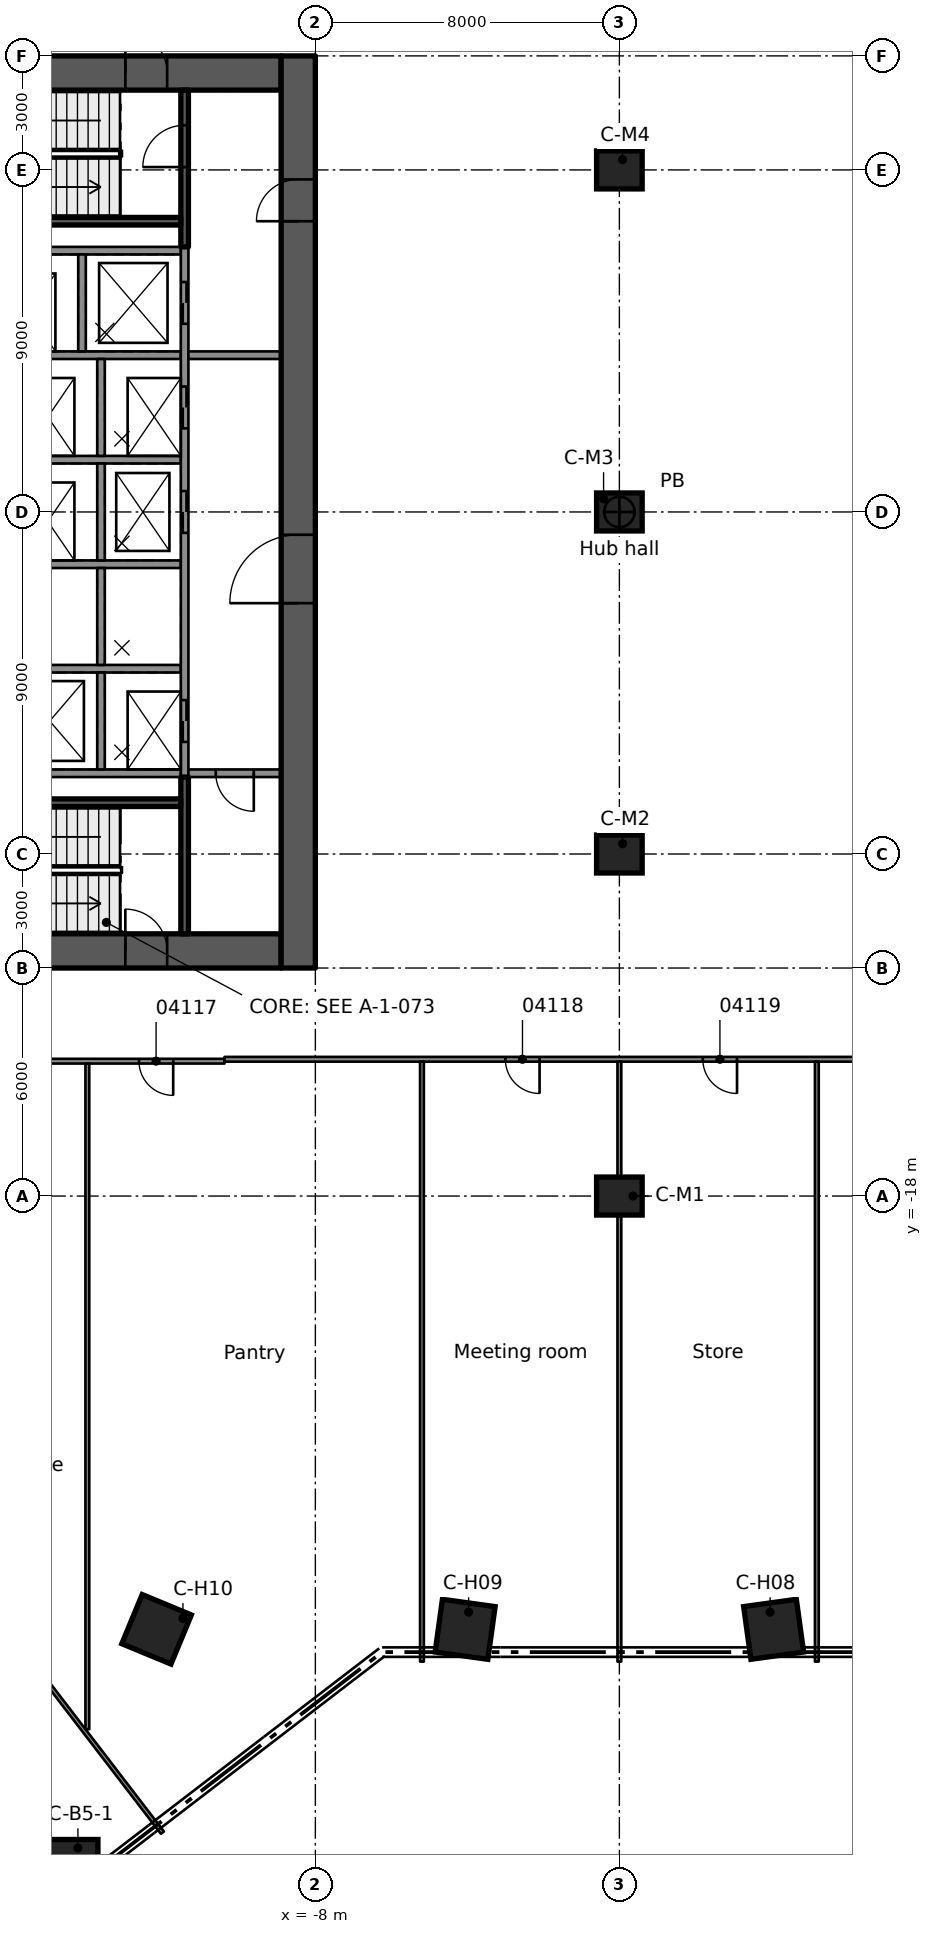
"""IFC4 building model, lengths in metres.
Left out: names, types, materials, properties, quantities, classifications, styles, units other than length and angle.
Written with IfcOpenShell. Run it as: python <this file> out.ifc"""

import sys

from ifc_helpers import new_model, si_unit, direction, frame, frame_2d, origin, origin_2d, place, context, subcontext, project, spatial, rectangle, extrude, element, fill, save


model = new_model("IFC4")
c1 = context("Model", 3, precision=1e-05, world=origin(), true_north=direction((0.0, 1.0)))
c2 = subcontext(c1, "Body", "Model", "MODEL_VIEW")
j1 = project(units=[si_unit("LENGTHUNIT", "METRE"), si_unit("PLANEANGLEUNIT", "RADIAN")], contexts=[c1])
p1 = place(None, origin())
s1 = spatial("IfcSite", under=j1, at=p1, CompositionType="ELEMENT")
p2 = place(p1, origin())
s2 = spatial("IfcBuilding", under=s1, at=p2, CompositionType="ELEMENT")
p3 = place(p2, frame((0.0, 0.0, 20.5)))
s3 = spatial("IfcBuildingStorey", under=s2, at=p3, CompositionType="ELEMENT", Elevation=20.5)
p4 = place(p3, frame((-18.1, 11.55, 0.0), z_axis=(0.0, 0.0, 1.0), x_axis=(1.0, 0.0, 0.0)))
e1 = element("IfcWall", 1, at=p4, inside=s3, PredefinedType="SHEAR", context=c2, shape_type="SweptSolid", body=[
    extrude(rectangle(XDim=9.2, YDim=0.9, at=frame_2d((4.6, 0.0))), origin(), (0.0, 0.0, 1.0), 4.6),
])
p5 = place(p4, frame((5.1, 0.0, 0.0)))
e2 = element("IfcOpeningElement", 2, at=p5, cuts=e1, PredefinedType="OPENING", context=c2, shape_type="SweptSolid", body=[
    extrude(rectangle(XDim=1.1, YDim=2.1, at=frame_2d((0.55, 1.05))), frame((0.0, 0.46, 0.0), z_axis=(0.0, -1.0, 0.0), x_axis=(1.0, 0.0, 0.0)), (0.0, 0.0, 1.0), 0.92),
])
p6 = place(p3, frame((-18.1, -11.55, 0.0), z_axis=(0.0, 0.0, 1.0), x_axis=(1.0, 0.0, 0.0)))
e3 = element("IfcWall", 3, at=p6, inside=s3, PredefinedType="SHEAR", context=c2, shape_type="SweptSolid", body=[
    extrude(rectangle(XDim=9.2, YDim=0.9, at=frame_2d((4.6, 0.0))), origin(), (0.0, 0.0, 1.0), 4.6),
])
p7 = place(p6, frame((5.1, 0.0, 0.0)))
e4 = element("IfcOpeningElement", 4, at=p7, cuts=e3, PredefinedType="OPENING", context=c2, shape_type="SweptSolid", body=[
    extrude(rectangle(XDim=1.1, YDim=2.1, at=frame_2d((0.55, 1.05))), frame((0.0, 0.46, 0.0), z_axis=(0.0, -1.0, 0.0), x_axis=(1.0, 0.0, 0.0)), (0.0, 0.0, 1.0), 0.92),
])
p8 = place(p3, frame((-8.45, -12.0, 0.0), z_axis=(0.0, 0.0, 1.0), x_axis=(0.0, 1.0, 0.0)))
e5 = element("IfcWall", 5, at=p8, inside=s3, PredefinedType="SHEAR", context=c2, shape_type="SweptSolid", body=[
    extrude(rectangle(XDim=24.0, YDim=0.9, at=frame_2d((12.0, 0.0))), origin(), (0.0, 0.0, 1.0), 4.6),
])
p9 = place(p8, frame((9.6, 0.0, 0.0)))
e6 = element("IfcOpeningElement", 6, at=p9, cuts=e5, PredefinedType="OPENING", context=c2, shape_type="SweptSolid", body=[
    extrude(rectangle(XDim=1.8, YDim=2.1, at=frame_2d((0.9, 1.05))), frame((0.0, 0.46, 0.0), z_axis=(0.0, -1.0, 0.0), x_axis=(1.0, 0.0, 0.0)), (0.0, 0.0, 1.0), 0.92),
])
p10 = place(p8, frame((19.65, 0.0, 0.0)))
e7 = element("IfcOpeningElement", 7, at=p10, cuts=e5, PredefinedType="OPENING", context=c2, shape_type="SweptSolid", body=[
    extrude(rectangle(XDim=1.1, YDim=2.1, at=frame_2d((0.55, 1.05))), frame((0.0, 0.46, 0.0), z_axis=(0.0, -1.0, 0.0), x_axis=(1.0, 0.0, 0.0)), (0.0, 0.0, 1.0), 0.92),
])
p11 = place(p3, frame((-14.371, -35.48, 0.0), z_axis=(0.0, 0.0, 1.0), x_axis=(1.0, 0.0, 0.0)))
e8 = element("IfcColumn", 8, at=p11, inside=s3, PredefinedType="COLUMN", context=c2, shape_type="SweptSolid", body=[
    extrude(rectangle(XDim=1.3, YDim=1.1, at=origin_2d()), origin(), (0.0, 0.0, 1.0), 4.6),
])
for number, where, z_axis, x_axis in (
    (9, (4.059, -29.4, 0.0), (0.0, 0.0, 1.0), (0.137, -0.991, 0.0)),
    (10, (-4.059, -29.4, 0.0), (0.0, 0.0, 1.0), (-0.137, -0.991, 0.0)),
    (11, (-12.178, -29.4, 0.0), (0.0, 0.0, 1.0), (-0.383, -0.924, 0.0)),
):
    element("IfcColumn", number, at=place(p3, frame(where, z_axis=z_axis, x_axis=x_axis)), inside=s3, PredefinedType="COLUMN", context=c2, shape_type="SweptSolid", body=[
        extrude(rectangle(XDim=1.4, YDim=1.4, at=origin_2d()), origin(), (0.0, 0.0, 1.0), 4.6),
    ])
for number, where, z_axis, x_axis in (
    (12, (0.0, -18.0, 0.0), (0.0, 0.0, 1.0), (1.0, 0.0, 0.0)),
    (13, (0.0, -9.0, 0.0), (0.0, 0.0, 1.0), (1.0, 0.0, 0.0)),
    (14, (0.0, 0.0, 0.0), (0.0, 0.0, 1.0), (1.0, 0.0, 0.0)),
    (15, (0.0, 9.0, 0.0), (0.0, 0.0, 1.0), (1.0, 0.0, 0.0)),
):
    element("IfcColumn", number, at=place(p3, frame(where, z_axis=z_axis, x_axis=x_axis)), inside=s3, PredefinedType="COLUMN", context=c2, shape_type="SweptSolid", body=[
        extrude(rectangle(XDim=1.2, YDim=1.0, at=origin_2d()), origin(), (0.0, 0.0, 1.0), 4.6),
    ])
for number, where, z_axis, x_axis in (
    (16, (-11.54, 6.875, 0.0), (0.0, 0.0, 1.0), (-1.0, 0.0, 0.0)),
    (17, (-11.54, -6.875, 0.0), (0.0, 0.0, 1.0), (-1.0, 0.0, 0.0)),
):
    element("IfcWall", number, at=place(p3, frame(where, z_axis=z_axis, x_axis=x_axis)), inside=s3, PredefinedType="SOLIDWALL", context=c2, shape_type="SweptSolid", body=[
        extrude(rectangle(XDim=6.56, YDim=0.2, at=frame_2d((3.28, 0.0))), origin(), (0.0, 0.0, 1.0), 4.18),
    ])
p12 = place(p3, frame((-11.54, -4.125, 0.0), z_axis=(0.0, 0.0, 1.0), x_axis=(-1.0, 0.0, 0.0)))
e18 = element("IfcWall", 18, at=p12, inside=s3, PredefinedType="SOLIDWALL", context=c2, shape_type="SweptSolid", body=[
    extrude(rectangle(XDim=4.7, YDim=0.2, at=frame_2d((2.35, 0.0))), origin(), (0.0, 0.0, 1.0), 4.18),
])
for number, where, z_axis, x_axis in (
    (19, (-11.54, -1.375, 0.0), (0.0, 0.0, 1.0), (-1.0, 0.0, 0.0)),
    (20, (-11.54, 1.375, 0.0), (0.0, 0.0, 1.0), (-1.0, 0.0, 0.0)),
):
    element("IfcWall", number, at=place(p3, frame(where, z_axis=z_axis, x_axis=x_axis)), inside=s3, PredefinedType="SOLIDWALL", context=c2, shape_type="SweptSolid", body=[
        extrude(rectangle(XDim=4.2, YDim=0.2, at=frame_2d((2.1, 0.0))), origin(), (0.0, 0.0, 1.0), 4.18),
    ])
p13 = place(p3, frame((-11.54, 4.125, 0.0), z_axis=(0.0, 0.0, 1.0), x_axis=(-1.0, 0.0, 0.0)))
e21 = element("IfcWall", 21, at=p13, inside=s3, PredefinedType="SOLIDWALL", context=c2, shape_type="SweptSolid", body=[
    extrude(rectangle(XDim=4.7, YDim=0.2, at=frame_2d((2.35, 0.0))), origin(), (0.0, 0.0, 1.0), 4.18),
])
p14 = place(p3, frame((-11.44, -6.975, 0.0), z_axis=(0.0, 0.0, 1.0), x_axis=(0.0, 1.0, 0.0)))
e22 = element("IfcWall", 22, at=p14, inside=s3, PredefinedType="SOLIDWALL", context=c2, shape_type="SweptSolid", body=[
    extrude(rectangle(XDim=13.95, YDim=0.2, at=frame_2d((6.975, 0.0))), origin(), (0.0, 0.0, 1.0), 4.18),
])
p15 = place(p14, frame((0.925, 0.0, 0.0)))
e23 = element("IfcOpeningElement", 23, at=p15, cuts=e22, PredefinedType="OPENING", context=c2, shape_type="SweptSolid", body=[
    extrude(rectangle(XDim=1.1, YDim=2.1, at=frame_2d((0.55, 1.05))), frame((0.0, 0.11, 0.0), z_axis=(0.0, -1.0, 0.0), x_axis=(1.0, 0.0, 0.0)), (0.0, 0.0, 1.0), 0.22),
])
p16 = place(p14, frame((6.425, 0.0, 0.0)))
e24 = element("IfcOpeningElement", 24, at=p16, cuts=e22, PredefinedType="OPENING", context=c2, shape_type="SweptSolid", body=[
    extrude(rectangle(XDim=1.1, YDim=2.1, at=frame_2d((0.55, 1.05))), frame((0.0, 0.11, 0.0), z_axis=(0.0, -1.0, 0.0), x_axis=(1.0, 0.0, 0.0)), (0.0, 0.0, 1.0), 0.22),
])
p17 = place(p14, frame((9.175, 0.0, 0.0)))
e25 = element("IfcOpeningElement", 25, at=p17, cuts=e22, PredefinedType="OPENING", context=c2, shape_type="SweptSolid", body=[
    extrude(rectangle(XDim=1.1, YDim=2.1, at=frame_2d((0.55, 1.05))), frame((0.0, 0.11, 0.0), z_axis=(0.0, -1.0, 0.0), x_axis=(1.0, 0.0, 0.0)), (0.0, 0.0, 1.0), 0.22),
])
p18 = place(p14, frame((11.925, 0.0, 0.0)))
e26 = element("IfcOpeningElement", 26, at=p18, cuts=e22, PredefinedType="OPENING", context=c2, shape_type="SweptSolid", body=[
    extrude(rectangle(XDim=1.1, YDim=2.1, at=frame_2d((0.55, 1.05))), frame((0.0, 0.11, 0.0), z_axis=(0.0, -1.0, 0.0), x_axis=(1.0, 0.0, 0.0)), (0.0, 0.0, 1.0), 0.22),
])
for number, where, z_axis, x_axis in (
    (27, (-13.64, -6.775, 0.0), (0.0, 0.0, 1.0), (0.0, 1.0, 0.0)),
    (28, (-13.64, -4.025, 0.0), (0.0, 0.0, 1.0), (0.0, 1.0, 0.0)),
    (29, (-13.64, -1.275, 0.0), (0.0, 0.0, 1.0), (0.0, 1.0, 0.0)),
    (30, (-13.64, 1.475, 0.0), (0.0, 0.0, 1.0), (0.0, 1.0, 0.0)),
    (31, (-14.14, 4.225, 0.0), (0.0, 0.0, 1.0), (0.0, 1.0, 0.0)),
):
    element("IfcWall", number, at=place(p3, frame(where, z_axis=z_axis, x_axis=x_axis)), inside=s3, PredefinedType="SOLIDWALL", context=c2, shape_type="SweptSolid", body=[
        extrude(rectangle(XDim=2.55, YDim=0.2, at=frame_2d((1.275, 0.0))), origin(), (0.0, 0.0, 1.0), 4.18),
    ])
p19 = place(p3, frame((-11.44, 6.975, 0.0), z_axis=(0.0, 0.0, 1.0), x_axis=(0.0, 1.0, 0.0)))
e32 = element("IfcWall", 32, at=p19, inside=s3, PredefinedType="SOLIDWALL", context=c2, shape_type="SweptSolid", body=[
    extrude(rectangle(XDim=4.125, YDim=0.2, at=frame_2d((2.062, 0.0))), origin(), (0.0, 0.0, 1.0), 4.18),
])
p20 = place(p19, frame((2.1, 0.0, 0.0)))
e33 = element("IfcOpeningElement", 33, at=p20, cuts=e32, PredefinedType="OPENING", context=c2, shape_type="SweptSolid", body=[
    extrude(rectangle(XDim=1.1, YDim=2.1, at=frame_2d((0.55, 1.05))), frame((0.0, 0.11, 0.0), z_axis=(0.0, -1.0, 0.0), x_axis=(1.0, 0.0, 0.0)), (0.0, 0.0, 1.0), 0.22),
])
p21 = place(p3, frame((-11.54, 7.65, 0.0), z_axis=(0.0, 0.0, 1.0), x_axis=(-1.0, 0.0, 0.0)))
e34 = element("IfcWall", 34, at=p21, inside=s3, PredefinedType="SOLIDWALL", context=c2, shape_type="SweptSolid", body=[
    extrude(rectangle(XDim=6.56, YDim=0.2, at=frame_2d((3.28, 0.0))), origin(), (0.0, 0.0, 1.0), 4.18),
])
p22 = place(p3, frame((-11.44, -11.1, 0.0), z_axis=(0.0, 0.0, 1.0), x_axis=(0.0, 1.0, 0.0)))
e35 = element("IfcWall", 35, at=p22, inside=s3, PredefinedType="SOLIDWALL", context=c2, shape_type="SweptSolid", body=[
    extrude(rectangle(XDim=4.125, YDim=0.2, at=frame_2d((2.062, 0.0))), origin(), (0.0, 0.0, 1.0), 4.18),
])
p23 = place(p3, frame((-11.54, -7.65, 0.0), z_axis=(0.0, 0.0, 1.0), x_axis=(-1.0, 0.0, 0.0)))
e36 = element("IfcWall", 36, at=p23, inside=s3, PredefinedType="SOLIDWALL", context=c2, shape_type="SweptSolid", body=[
    extrude(rectangle(XDim=6.56, YDim=0.2, at=frame_2d((3.28, 0.0))), origin(), (0.0, 0.0, 1.0), 4.18),
])
p24 = place(p3, frame((-8.9, 4.125, 0.0), z_axis=(0.0, 0.0, 1.0), x_axis=(-1.0, 0.0, 0.0)))
e37 = element("IfcWall", 37, at=p24, inside=s3, PredefinedType="PARTITIONING", context=c2, shape_type="SweptSolid", body=[
    extrude(rectangle(XDim=2.44, YDim=0.2, at=frame_2d((1.22, 0.0))), origin(), (0.0, 0.0, 1.0), 4.18),
])
p25 = place(p3, frame((-8.9, -6.875, 0.0), z_axis=(0.0, 0.0, 1.0), x_axis=(-1.0, 0.0, 0.0)))
e38 = element("IfcWall", 38, at=p25, inside=s3, PredefinedType="PARTITIONING", context=c2, shape_type="SweptSolid", body=[
    extrude(rectangle(XDim=2.44, YDim=0.2, at=frame_2d((1.22, 0.0))), origin(), (0.0, 0.0, 1.0), 4.18),
])
p26 = place(p25, frame((0.72, 0.0, 0.0)))
e39 = element("IfcOpeningElement", 39, at=p26, cuts=e38, PredefinedType="OPENING", context=c2, shape_type="SweptSolid", body=[
    extrude(rectangle(XDim=1.0, YDim=2.1, at=frame_2d((0.5, 1.05))), frame((0.0, 0.11, 0.0), z_axis=(0.0, -1.0, 0.0), x_axis=(1.0, 0.0, 0.0)), (0.0, 0.0, 1.0), 0.22),
])
p27 = place(p3, frame((-20.63, -23.535, 0.0), z_axis=(0.0, 0.0, 1.0), x_axis=(0.60874219909, -0.793368095557, 0.0)))
e40 = element("IfcWall", 40, at=p27, inside=s3, PredefinedType="PARTITIONING", context=c2, shape_type="SweptSolid", body=[
    extrude(rectangle(XDim=14.137, YDim=0.1, at=frame_2d((7.069, 0.0))), origin(), (0.0, 0.0, 1.0), 4.16),
])
p28 = place(p3, frame((-10.391, -14.451, 0.0), z_axis=(0.0, 0.0, 1.0), x_axis=(-1.0, 0.0, 0.0)))
e41 = element("IfcWall", 41, at=p28, inside=s3, PredefinedType="PARTITIONING", context=c2, shape_type="SweptSolid", body=[
    extrude(rectangle(XDim=7.871, YDim=0.125, at=frame_2d((3.936, 0.0))), origin(), (0.0, 0.0, 1.0), 4.16),
])
p29 = place(p28, frame((5.209, 0.0, 0.0)))
e42 = element("IfcOpeningElement", 42, at=p29, cuts=e41, PredefinedType="OPENING", context=c2, shape_type="SweptSolid", body=[
    extrude(rectangle(XDim=1.1, YDim=2.1, at=frame_2d((0.55, 1.05))), frame((0.0, 0.073, 0.0), z_axis=(0.0, -1.0, 0.0), x_axis=(1.0, 0.0, 0.0)), (0.0, 0.0, 1.0), 0.145),
])
p30 = place(p28, frame((1.35, 0.0, 0.0)))
e43 = element("IfcOpeningElement", 43, at=p30, cuts=e41, PredefinedType="OPENING", context=c2, shape_type="SweptSolid", body=[
    extrude(rectangle(XDim=0.9, YDim=2.1, at=frame_2d((0.45, 1.05))), frame((0.0, 0.073, 0.0), z_axis=(0.0, -1.0, 0.0), x_axis=(1.0, 0.0, 0.0)), (0.0, 0.0, 1.0), 0.145),
])
p31 = place(p3, frame((10.391, -14.401, 0.0), z_axis=(0.0, 0.0, 1.0), x_axis=(-1.0, 0.0, 0.0)))
e44 = element("IfcWall", 44, at=p31, inside=s3, PredefinedType="PARTITIONING", context=c2, shape_type="SweptSolid", body=[
    extrude(rectangle(XDim=20.781, YDim=0.125, at=frame_2d((10.391, 0.0))), origin(), (0.0, 0.0, 1.0), 4.16),
])
p32 = place(p31, frame((12.491, 0.0, 0.0)))
e45 = element("IfcOpeningElement", 45, at=p32, cuts=e44, PredefinedType="OPENING", context=c2, shape_type="SweptSolid", body=[
    extrude(rectangle(XDim=0.9, YDim=2.1, at=frame_2d((0.45, 1.05))), frame((0.0, 0.073, 0.0), z_axis=(0.0, -1.0, 0.0), x_axis=(1.0, 0.0, 0.0)), (0.0, 0.0, 1.0), 0.145),
])
p33 = place(p31, frame((7.295, 0.0, 0.0)))
e46 = element("IfcOpeningElement", 46, at=p33, cuts=e44, PredefinedType="OPENING", context=c2, shape_type="SweptSolid", body=[
    extrude(rectangle(XDim=0.9, YDim=2.1, at=frame_2d((0.45, 1.05))), frame((0.0, 0.073, 0.0), z_axis=(0.0, -1.0, 0.0), x_axis=(1.0, 0.0, 0.0)), (0.0, 0.0, 1.0), 0.145),
])
for number, where, z_axis, x_axis in (
    (47, (5.196, -30.25, 0.0), (0.0, 0.0, 1.0), (0.0, 1.0, 0.0)),
    (48, (0.0, -30.25, 0.0), (0.0, 0.0, 1.0), (0.0, 1.0, 0.0)),
    (49, (-5.195, -30.25, 0.0), (0.0, 0.0, 1.0), (0.0, 1.0, 0.0)),
):
    element("IfcWall", number, at=place(p3, frame(where, z_axis=z_axis, x_axis=x_axis)), inside=s3, PredefinedType="PARTITIONING", context=c2, shape_type="SweptSolid", body=[
        extrude(rectangle(XDim=15.787, YDim=0.1, at=frame_2d((7.894, 0.0))), origin(), (0.0, 0.0, 1.0), 4.16),
    ])
p34 = place(p3, frame((-14.0, -32.028, 0.0), z_axis=(0.0, 0.0, 1.0), x_axis=(0.0, 1.0, 0.0)))
e50 = element("IfcWall", 50, at=p34, inside=s3, PredefinedType="PARTITIONING", context=c2, shape_type="SweptSolid", body=[
    extrude(rectangle(XDim=17.514, YDim=0.1, at=frame_2d((8.757, 0.0))), origin(), (0.0, 0.0, 1.0), 4.16),
])
p35 = place(p15, origin())
e51 = element("IfcDoor", 51, at=p35, inside=s3, OperationType="DOUBLE_DOOR_SLIDING", PredefinedType="DOOR", context=c2, shape_type="SweptSolid", body=[
    extrude(rectangle(XDim=1.1, YDim=2.1, at=frame_2d((0.55, 1.05))), frame((0.0, 0.025, 0.0), z_axis=(0.0, -1.0, 0.0), x_axis=(1.0, 0.0, 0.0)), (0.0, 0.0, 1.0), 0.05),
])
fill(e23, e51)
p36 = place(p16, origin())
e52 = element("IfcDoor", 52, at=p36, inside=s3, OperationType="DOUBLE_DOOR_SLIDING", PredefinedType="DOOR", context=c2, shape_type="SweptSolid", body=[
    extrude(rectangle(XDim=1.1, YDim=2.1, at=frame_2d((0.55, 1.05))), frame((0.0, 0.025, 0.0), z_axis=(0.0, -1.0, 0.0), x_axis=(1.0, 0.0, 0.0)), (0.0, 0.0, 1.0), 0.05),
])
fill(e24, e52)
p37 = place(p17, origin())
e53 = element("IfcDoor", 53, at=p37, inside=s3, OperationType="DOUBLE_DOOR_SLIDING", PredefinedType="DOOR", context=c2, shape_type="SweptSolid", body=[
    extrude(rectangle(XDim=1.1, YDim=2.1, at=frame_2d((0.55, 1.05))), frame((0.0, 0.025, 0.0), z_axis=(0.0, -1.0, 0.0), x_axis=(1.0, 0.0, 0.0)), (0.0, 0.0, 1.0), 0.05),
])
fill(e25, e53)
p38 = place(p18, origin())
e54 = element("IfcDoor", 54, at=p38, inside=s3, OperationType="DOUBLE_DOOR_SLIDING", PredefinedType="DOOR", context=c2, shape_type="SweptSolid", body=[
    extrude(rectangle(XDim=1.1, YDim=2.1, at=frame_2d((0.55, 1.05))), frame((0.0, 0.025, 0.0), z_axis=(0.0, -1.0, 0.0), x_axis=(1.0, 0.0, 0.0)), (0.0, 0.0, 1.0), 0.05),
])
fill(e26, e54)
p39 = place(p9, origin())
e55 = element("IfcDoor", 55, at=p39, inside=s3, OperationType="SINGLE_SWING_LEFT", PredefinedType="DOOR", context=c2, shape_type="SweptSolid", body=[
    extrude(rectangle(XDim=1.8, YDim=2.1, at=frame_2d((0.9, 1.05))), frame((0.0, 0.025, 0.0), z_axis=(0.0, -1.0, 0.0), x_axis=(1.0, 0.0, 0.0)), (0.0, 0.0, 1.0), 0.05),
])
fill(e6, e55)
p40 = place(p10, origin())
e56 = element("IfcDoor", 56, at=p40, inside=s3, OperationType="SINGLE_SWING_RIGHT", PredefinedType="DOOR", context=c2, shape_type="SweptSolid", body=[
    extrude(rectangle(XDim=1.1, YDim=2.1, at=frame_2d((0.55, 1.05))), frame((0.0, 0.025, 0.0), z_axis=(0.0, -1.0, 0.0), x_axis=(1.0, 0.0, 0.0)), (0.0, 0.0, 1.0), 0.05),
])
fill(e7, e56)
p41 = place(p5, origin())
e57 = element("IfcDoor", 57, at=p41, inside=s3, OperationType="SINGLE_SWING_RIGHT", PredefinedType="DOOR", context=c2, shape_type="SweptSolid", body=[
    extrude(rectangle(XDim=1.1, YDim=2.1, at=frame_2d((0.55, 1.05))), frame((0.0, 0.025, 0.0), z_axis=(0.0, -1.0, 0.0), x_axis=(1.0, 0.0, 0.0)), (0.0, 0.0, 1.0), 0.05),
])
fill(e2, e57)
p42 = place(p7, origin())
e58 = element("IfcDoor", 58, at=p42, inside=s3, OperationType="SINGLE_SWING_RIGHT", PredefinedType="DOOR", context=c2, shape_type="SweptSolid", body=[
    extrude(rectangle(XDim=1.1, YDim=2.1, at=frame_2d((0.55, 1.05))), frame((0.0, 0.025, 0.0), z_axis=(0.0, -1.0, 0.0), x_axis=(1.0, 0.0, 0.0)), (0.0, 0.0, 1.0), 0.05),
])
fill(e4, e58)
p43 = place(p20, origin())
e59 = element("IfcDoor", 59, at=p43, inside=s3, OperationType="SINGLE_SWING_RIGHT", PredefinedType="DOOR", context=c2, shape_type="SweptSolid", body=[
    extrude(rectangle(XDim=1.1, YDim=2.1, at=frame_2d((0.55, 1.05))), frame((0.0, 0.025, 0.0), z_axis=(0.0, -1.0, 0.0), x_axis=(1.0, 0.0, 0.0)), (0.0, 0.0, 1.0), 0.05),
])
fill(e33, e59)
p44 = place(p26, origin())
e60 = element("IfcDoor", 60, at=p44, inside=s3, OperationType="SINGLE_SWING_RIGHT", PredefinedType="DOOR", context=c2, shape_type="SweptSolid", body=[
    extrude(rectangle(XDim=1.0, YDim=2.1, at=frame_2d((0.5, 1.05))), frame((0.0, 0.025, 0.0), z_axis=(0.0, -1.0, 0.0), x_axis=(1.0, 0.0, 0.0)), (0.0, 0.0, 1.0), 0.05),
])
fill(e39, e60)
p45 = place(p30, origin())
e61 = element("IfcDoor", 61, at=p45, inside=s3, OperationType="SINGLE_SWING_LEFT", PredefinedType="DOOR", context=c2, shape_type="SweptSolid", body=[
    extrude(rectangle(XDim=0.9, YDim=2.1, at=frame_2d((0.45, 1.05))), frame((0.0, 0.025, 0.0), z_axis=(0.0, -1.0, 0.0), x_axis=(1.0, 0.0, 0.0)), (0.0, 0.0, 1.0), 0.05),
])
fill(e43, e61)
p46 = place(p32, origin())
e62 = element("IfcDoor", 62, at=p46, inside=s3, OperationType="SINGLE_SWING_RIGHT", PredefinedType="DOOR", context=c2, shape_type="SweptSolid", body=[
    extrude(rectangle(XDim=0.9, YDim=2.1, at=frame_2d((0.45, 1.05))), frame((0.0, 0.025, 0.0), z_axis=(0.0, -1.0, 0.0), x_axis=(1.0, 0.0, 0.0)), (0.0, 0.0, 1.0), 0.05),
])
fill(e45, e62)
p47 = place(p33, origin())
e63 = element("IfcDoor", 63, at=p47, inside=s3, OperationType="SINGLE_SWING_LEFT", PredefinedType="DOOR", context=c2, shape_type="SweptSolid", body=[
    extrude(rectangle(XDim=0.9, YDim=2.1, at=frame_2d((0.45, 1.05))), frame((0.0, 0.025, 0.0), z_axis=(0.0, -1.0, 0.0), x_axis=(1.0, 0.0, 0.0)), (0.0, 0.0, 1.0), 0.05),
])
fill(e46, e63)
save(model, sys.argv[1])
